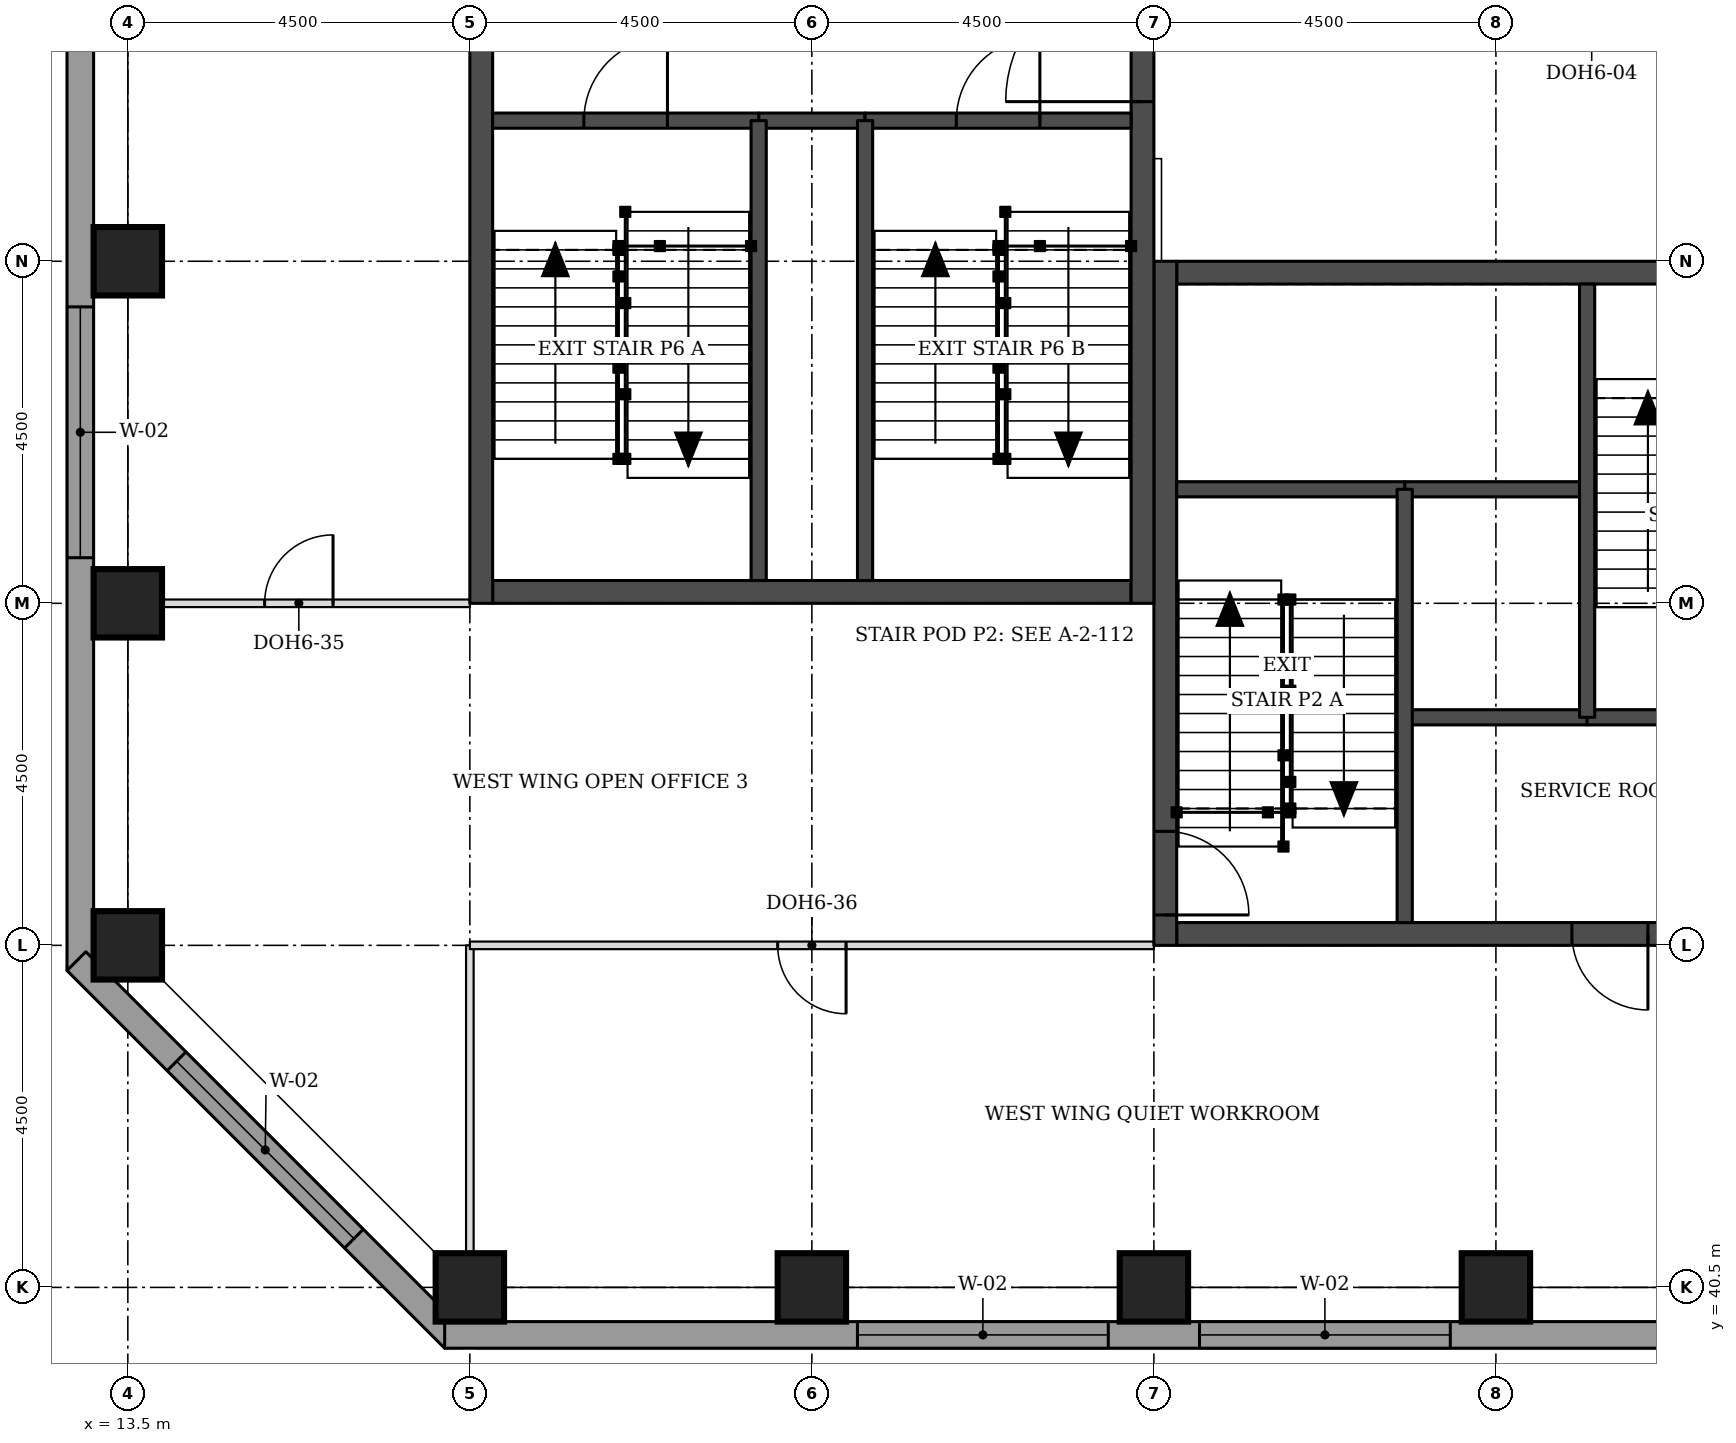
"""IFC4 building model, lengths in metres.
Left out: names, types, materials, properties, quantities, classifications, styles, units other than length and angle.
Written with IfcOpenShell. Run it as: python <this file> out.ifc"""

import sys

from ifc_helpers import new_model, si_unit, direction, frame, frame_2d, origin, origin_2d, place, context, subcontext, project, spatial, rectangle, extrude, element, fill, save


model = new_model("IFC4")
c1 = context("Model", 3, precision=1e-05, world=origin(), true_north=direction((0.0, 1.0)))
c2 = subcontext(c1, "Body", "Model", "MODEL_VIEW")
j1 = project(units=[si_unit("LENGTHUNIT", "METRE"), si_unit("PLANEANGLEUNIT", "RADIAN")], contexts=[c1])
p1 = place(None, origin())
s1 = spatial("IfcSite", under=j1, at=p1, CompositionType="ELEMENT")
p2 = place(p1, origin())
s2 = spatial("IfcBuilding", under=s1, at=p2, CompositionType="ELEMENT")
p3 = place(p2, frame((0.0, 0.0, 188.4)))
s3 = spatial("IfcBuildingStorey", under=s2, at=p3, CompositionType="ELEMENT", Elevation=188.4)
for number, where, z_axis, x_axis in (
    (1, (18.0, 40.5, 0.0), (0.0, 0.0, 1.0), (1.0, 0.0, 0.0)),
    (2, (22.5, 40.5, 0.0), (0.0, 0.0, 1.0), (1.0, 0.0, 0.0)),
    (3, (27.0, 40.5, 0.0), (0.0, 0.0, 1.0), (1.0, 0.0, 0.0)),
    (4, (31.5, 40.5, 0.0), (0.0, 0.0, 1.0), (1.0, 0.0, 0.0)),
    (5, (13.5, 45.0, 0.0), (0.0, 0.0, 1.0), (1.0, 0.0, 0.0)),
    (6, (13.5, 49.5, 0.0), (0.0, 0.0, 1.0), (1.0, 0.0, 0.0)),
    (7, (13.5, 54.0, 0.0), (0.0, 0.0, 1.0), (1.0, 0.0, 0.0)),
):
    element("IfcColumn", number, at=place(p3, frame(where, z_axis=z_axis, x_axis=x_axis)), inside=s3, PredefinedType="COLUMN", context=c2, shape_type="SweptSolid", body=[
        extrude(rectangle(XDim=0.9, YDim=0.9, at=origin_2d()), origin(), (0.0, 0.0, 1.0), 3.7),
    ])
p4 = place(p3, frame((27.3, 45.15, 0.0), z_axis=(0.0, 0.0, 1.0), x_axis=(1.0, 0.0, 0.0)))
e8 = element("IfcWall", 8, at=p4, inside=s3, PredefinedType="SHEAR", context=c2, shape_type="SweptSolid", body=[
    extrude(rectangle(XDim=8.4, YDim=0.3, at=frame_2d((4.2, 0.0))), origin(), (0.0, 0.0, 1.0), 3.7),
])
p5 = place(p4, frame((5.2, 0.0, 0.0)))
e9 = element("IfcOpeningElement", 9, at=p5, cuts=e8, PredefinedType="OPENING", context=c2, shape_type="SweptSolid", body=[
    extrude(rectangle(XDim=1.0, YDim=2.1, at=frame_2d((0.5, 1.05))), frame((0.0, 0.16, 0.0), z_axis=(0.0, -1.0, 0.0), x_axis=(1.0, 0.0, 0.0)), (0.0, 0.0, 1.0), 0.32),
])
p6 = place(p3, frame((27.3, 53.85, 0.0), z_axis=(0.0, 0.0, 1.0), x_axis=(1.0, 0.0, 0.0)))
e10 = element("IfcWall", 10, at=p6, inside=s3, PredefinedType="SHEAR", context=c2, shape_type="SweptSolid", body=[
    extrude(rectangle(XDim=8.4, YDim=0.3, at=frame_2d((4.2, 0.0))), origin(), (0.0, 0.0, 1.0), 3.7),
])
p7 = place(p6, frame((6.4, 0.0, 0.0)))
e11 = element("IfcOpeningElement", 11, at=p7, cuts=e10, PredefinedType="OPENING", context=c2, shape_type="SweptSolid", body=[
    extrude(rectangle(XDim=1.1, YDim=2.1, at=frame_2d((0.55, 1.05))), frame((0.0, 0.16, 0.0), z_axis=(0.0, -1.0, 0.0), x_axis=(1.0, 0.0, 0.0)), (0.0, 0.0, 1.0), 0.32),
])
p8 = place(p3, frame((27.15, 45.0, 0.0), z_axis=(0.0, 0.0, 1.0), x_axis=(0.0, 1.0, 0.0)))
e12 = element("IfcWall", 12, at=p8, inside=s3, PredefinedType="SHEAR", context=c2, shape_type="SweptSolid", body=[
    extrude(rectangle(XDim=9.0, YDim=0.3, at=frame_2d((4.5, 0.0))), origin(), (0.0, 0.0, 1.0), 3.7),
])
p9 = place(p8, frame((0.4, 0.0, 0.0)))
e13 = element("IfcOpeningElement", 13, at=p9, cuts=e12, PredefinedType="OPENING", context=c2, shape_type="SweptSolid", body=[
    extrude(rectangle(XDim=1.1, YDim=2.1, at=frame_2d((0.55, 1.05))), frame((0.0, 0.16, 0.0), z_axis=(0.0, -1.0, 0.0), x_axis=(1.0, 0.0, 0.0)), (0.0, 0.0, 1.0), 0.32),
])
p10 = place(p3, frame((18.3, 49.65, 0.0), z_axis=(0.0, 0.0, 1.0), x_axis=(1.0, 0.0, 0.0)))
e14 = element("IfcWall", 14, at=p10, inside=s3, PredefinedType="SHEAR", context=c2, shape_type="SweptSolid", body=[
    extrude(rectangle(XDim=8.4, YDim=0.3, at=frame_2d((4.2, 0.0))), origin(), (0.0, 0.0, 1.0), 3.7),
])
p11 = place(p3, frame((18.15, 49.5, 0.0), z_axis=(0.0, 0.0, 1.0), x_axis=(0.0, 1.0, 0.0)))
e15 = element("IfcWall", 15, at=p11, inside=s3, PredefinedType="SHEAR", context=c2, shape_type="SweptSolid", body=[
    extrude(rectangle(XDim=9.0, YDim=0.3, at=frame_2d((4.5, 0.0))), origin(), (0.0, 0.0, 1.0), 3.7),
])
p12 = place(p3, frame((26.85, 49.5, 0.0), z_axis=(0.0, 0.0, 1.0), x_axis=(0.0, 1.0, 0.0)))
e16 = element("IfcWall", 16, at=p12, inside=s3, PredefinedType="SHEAR", context=c2, shape_type="SweptSolid", body=[
    extrude(rectangle(XDim=9.0, YDim=0.3, at=frame_2d((4.5, 0.0))), origin(), (0.0, 0.0, 1.0), 3.7),
])
p13 = place(p12, frame((6.6, 0.0, 0.0)))
e17 = element("IfcOpeningElement", 17, at=p13, cuts=e16, PredefinedType="OPENING", context=c2, shape_type="SweptSolid", body=[
    extrude(rectangle(XDim=1.8, YDim=2.1, at=frame_2d((0.9, 1.05))), frame((0.0, 0.16, 0.0), z_axis=(0.0, -1.0, 0.0), x_axis=(1.0, 0.0, 0.0)), (0.0, 0.0, 1.0), 0.32),
])
p14 = place(p3, frame((12.875, 58.831, 0.0), z_axis=(0.0, 0.0, 1.0), x_axis=(0.0, -1.0, 0.0)))
e18 = element("IfcWall", 18, at=p14, inside=s3, PredefinedType="STANDARD", context=c2, shape_type="SweptSolid", body=[
    extrude(rectangle(XDim=14.163, YDim=0.35, at=frame_2d((7.081, 0.0))), origin(), (0.0, 0.0, 1.0), 3.525),
])
p15 = place(p14, frame((5.431, 0.0, 0.9)))
e19 = element("IfcOpeningElement", 19, at=p15, cuts=e18, PredefinedType="OPENING", context=c2, shape_type="SweptSolid", body=[
    extrude(rectangle(XDim=3.3, YDim=1.9, at=frame_2d((1.65, 0.95))), frame((0.0, 0.185, 0.0), z_axis=(0.0, -1.0, 0.0), x_axis=(1.0, 0.0, 0.0)), (0.0, 0.0, 1.0), 0.37),
])
p16 = place(p3, frame((12.824, 44.792, 0.0), z_axis=(0.0, 0.0, 1.0), x_axis=(0.707106781187, -0.707106781187, 0.0)))
e20 = element("IfcWall", 20, at=p16, inside=s3, PredefinedType="STANDARD", context=c2, shape_type="SweptSolid", body=[
    extrude(rectangle(XDim=7.027, YDim=0.35, at=frame_2d((3.513, 0.0))), origin(), (0.0, 0.0, 1.0), 3.525),
])
p17 = place(p16, frame((1.863, 0.0, 0.9)))
e21 = element("IfcOpeningElement", 21, at=p17, cuts=e20, PredefinedType="OPENING", context=c2, shape_type="SweptSolid", body=[
    extrude(rectangle(XDim=3.3, YDim=1.9, at=frame_2d((1.65, 0.95))), frame((0.0, 0.185, 0.0), z_axis=(0.0, -1.0, 0.0), x_axis=(1.0, 0.0, 0.0)), (0.0, 0.0, 1.0), 0.37),
])
p18 = place(p3, frame((17.669, 39.875, 0.0), z_axis=(0.0, 0.0, 1.0), x_axis=(1.0, 0.0, 0.0)))
e22 = element("IfcWall", 22, at=p18, inside=s3, PredefinedType="STANDARD", context=c2, shape_type="SweptSolid", body=[
    extrude(rectangle(XDim=18.331, YDim=0.35, at=frame_2d((9.166, 0.0))), origin(), (0.0, 0.0, 1.0), 3.525),
])
p19 = place(p18, frame((5.431, 0.0, 0.9)))
e23 = element("IfcOpeningElement", 23, at=p19, cuts=e22, PredefinedType="OPENING", context=c2, shape_type="SweptSolid", body=[
    extrude(rectangle(XDim=3.3, YDim=1.9, at=frame_2d((1.65, 0.95))), frame((0.0, 0.185, 0.0), z_axis=(0.0, -1.0, 0.0), x_axis=(1.0, 0.0, 0.0)), (0.0, 0.0, 1.0), 0.37),
])
p20 = place(p18, frame((9.931, 0.0, 0.9)))
e24 = element("IfcOpeningElement", 24, at=p20, cuts=e22, PredefinedType="OPENING", context=c2, shape_type="SweptSolid", body=[
    extrude(rectangle(XDim=3.3, YDim=1.9, at=frame_2d((1.65, 0.95))), frame((0.0, 0.185, 0.0), z_axis=(0.0, -1.0, 0.0), x_axis=(1.0, 0.0, 0.0)), (0.0, 0.0, 1.0), 0.37),
])
p21 = place(p3, frame((13.5, 49.5, 0.0), z_axis=(0.0, 0.0, 1.0), x_axis=(1.0, 0.0, 0.0)))
e25 = element("IfcWall", 25, at=p21, inside=s3, PredefinedType="PARTITIONING", context=c2, shape_type="SweptSolid", body=[
    extrude(rectangle(XDim=4.5, YDim=0.1, at=frame_2d((2.25, 0.0))), origin(), (0.0, 0.0, 1.0), 3.55),
])
p22 = place(p21, frame((1.8, 0.0, 0.0)))
e26 = element("IfcOpeningElement", 26, at=p22, cuts=e25, PredefinedType="OPENING", context=c2, shape_type="SweptSolid", body=[
    extrude(rectangle(XDim=0.9, YDim=2.1, at=frame_2d((0.45, 1.05))), frame((0.0, 0.06, 0.0), z_axis=(0.0, -1.0, 0.0), x_axis=(1.0, 0.0, 0.0)), (0.0, 0.0, 1.0), 0.12),
])
p23 = place(p3, frame((18.0, 40.5, 0.0), z_axis=(0.0, 0.0, 1.0), x_axis=(0.0, 1.0, 0.0)))
e27 = element("IfcWall", 27, at=p23, inside=s3, PredefinedType="PARTITIONING", context=c2, shape_type="SweptSolid", body=[
    extrude(rectangle(XDim=4.5, YDim=0.1, at=frame_2d((2.25, 0.0))), origin(), (0.0, 0.0, 1.0), 3.55),
])
p24 = place(p3, frame((18.0, 45.0, 0.0), z_axis=(0.0, 0.0, 1.0), x_axis=(1.0, 0.0, 0.0)))
e28 = element("IfcWall", 28, at=p24, inside=s3, PredefinedType="PARTITIONING", context=c2, shape_type="SweptSolid", body=[
    extrude(rectangle(XDim=9.0, YDim=0.1, at=frame_2d((4.5, 0.0))), origin(), (0.0, 0.0, 1.0), 2.55),
])
p25 = place(p24, frame((4.05, 0.0, 0.0)))
e29 = element("IfcOpeningElement", 29, at=p25, cuts=e28, PredefinedType="OPENING", context=c2, shape_type="SweptSolid", body=[
    extrude(rectangle(XDim=0.9, YDim=2.1, at=frame_2d((0.45, 1.05))), frame((0.0, 0.06, 0.0), z_axis=(0.0, -1.0, 0.0), x_axis=(1.0, 0.0, 0.0)), (0.0, 0.0, 1.0), 0.12),
])
p26 = place(p3, frame((30.3, 48.0, 0.0), z_axis=(0.0, 0.0, 1.0), x_axis=(1.0, 0.0, 0.0)))
e30 = element("IfcWall", 30, at=p26, inside=s3, PredefinedType="SOLIDWALL", context=c2, shape_type="SweptSolid", body=[
    extrude(rectangle(XDim=2.4, YDim=0.2, at=frame_2d((1.2, 0.0))), origin(), (0.0, 0.0, 1.0), 3.55),
])
p27 = place(p3, frame((32.7, 48.0, 0.0), z_axis=(0.0, 0.0, 1.0), x_axis=(1.0, 0.0, 0.0)))
e31 = element("IfcWall", 31, at=p27, inside=s3, PredefinedType="SOLIDWALL", context=c2, shape_type="SweptSolid", body=[
    extrude(rectangle(XDim=3.0, YDim=0.2, at=frame_2d((1.5, 0.0))), origin(), (0.0, 0.0, 1.0), 3.55),
])
p28 = place(p3, frame((30.3, 51.0, 0.0), z_axis=(0.0, 0.0, 1.0), x_axis=(1.0, 0.0, 0.0)))
e32 = element("IfcWall", 32, at=p28, inside=s3, PredefinedType="SOLIDWALL", context=c2, shape_type="SweptSolid", body=[
    extrude(rectangle(XDim=2.4, YDim=0.2, at=frame_2d((1.2, 0.0))), origin(), (0.0, 0.0, 1.0), 3.7),
])
p29 = place(p3, frame((27.3, 51.0, 0.0), z_axis=(0.0, 0.0, 1.0), x_axis=(1.0, 0.0, 0.0)))
e33 = element("IfcWall", 33, at=p29, inside=s3, PredefinedType="SOLIDWALL", context=c2, shape_type="SweptSolid", body=[
    extrude(rectangle(XDim=3.0, YDim=0.2, at=frame_2d((1.5, 0.0))), origin(), (0.0, 0.0, 1.0), 3.55),
])
for number, where, z_axis, x_axis in (
    (34, (30.3, 45.3, 0.0), (0.0, 0.0, 1.0), (0.0, 1.0, 0.0)),
    (35, (32.7, 48.0, 0.0), (0.0, 0.0, 1.0), (0.0, 1.0, 0.0)),
):
    element("IfcWall", number, at=place(p3, frame(where, z_axis=z_axis, x_axis=x_axis)), inside=s3, PredefinedType="SOLIDWALL", context=c2, shape_type="SweptSolid", body=[
        extrude(rectangle(XDim=5.7, YDim=0.2, at=frame_2d((2.85, 0.0))), origin(), (0.0, 0.0, 1.0), 3.55),
    ])
p30 = place(p3, frame((21.8, 55.85, 0.0), z_axis=(0.0, 0.0, 1.0), x_axis=(1.0, 0.0, 0.0)))
e36 = element("IfcWall", 36, at=p30, inside=s3, PredefinedType="SOLIDWALL", context=c2, shape_type="SweptSolid", body=[
    extrude(rectangle(XDim=1.4, YDim=0.2, at=frame_2d((0.7, 0.0))), origin(), (0.0, 0.0, 1.0), 3.55),
])
p31 = place(p3, frame((18.3, 55.85, 0.0), z_axis=(0.0, 0.0, 1.0), x_axis=(1.0, 0.0, 0.0)))
e37 = element("IfcWall", 37, at=p31, inside=s3, PredefinedType="SOLIDWALL", context=c2, shape_type="SweptSolid", body=[
    extrude(rectangle(XDim=3.5, YDim=0.2, at=frame_2d((1.75, 0.0))), origin(), (0.0, 0.0, 1.0), 3.55),
])
p32 = place(p31, frame((1.2, 0.0, 0.0)))
e38 = element("IfcOpeningElement", 38, at=p32, cuts=e37, PredefinedType="OPENING", context=c2, shape_type="SweptSolid", body=[
    extrude(rectangle(XDim=1.1, YDim=2.1, at=frame_2d((0.55, 1.05))), frame((0.0, 0.11, 0.0), z_axis=(0.0, -1.0, 0.0), x_axis=(1.0, 0.0, 0.0)), (0.0, 0.0, 1.0), 0.22),
])
p33 = place(p3, frame((23.2, 55.85, 0.0), z_axis=(0.0, 0.0, 1.0), x_axis=(1.0, 0.0, 0.0)))
e39 = element("IfcWall", 39, at=p33, inside=s3, PredefinedType="SOLIDWALL", context=c2, shape_type="SweptSolid", body=[
    extrude(rectangle(XDim=3.5, YDim=0.2, at=frame_2d((1.75, 0.0))), origin(), (0.0, 0.0, 1.0), 3.55),
])
p34 = place(p33, frame((1.2, 0.0, 0.0)))
e40 = element("IfcOpeningElement", 40, at=p34, cuts=e39, PredefinedType="OPENING", context=c2, shape_type="SweptSolid", body=[
    extrude(rectangle(XDim=1.1, YDim=2.1, at=frame_2d((0.55, 1.05))), frame((0.0, 0.11, 0.0), z_axis=(0.0, -1.0, 0.0), x_axis=(1.0, 0.0, 0.0)), (0.0, 0.0, 1.0), 0.22),
])
for number, where, z_axis, x_axis in (
    (41, (21.8, 49.8, 0.0), (0.0, 0.0, 1.0), (0.0, 1.0, 0.0)),
    (42, (23.2, 49.8, 0.0), (0.0, 0.0, 1.0), (0.0, 1.0, 0.0)),
):
    element("IfcWall", number, at=place(p3, frame(where, z_axis=z_axis, x_axis=x_axis)), inside=s3, PredefinedType="SOLIDWALL", context=c2, shape_type="SweptSolid", body=[
        extrude(rectangle(XDim=6.05, YDim=0.2, at=frame_2d((3.025, 0.0))), origin(), (0.0, 0.0, 1.0), 3.55),
    ])
p35 = place(p15, origin())
e43 = element("IfcWindow", 43, at=p35, inside=s3, PartitioningType="SINGLE_PANEL", PredefinedType="WINDOW", context=c2, shape_type="SweptSolid", body=[
    extrude(rectangle(XDim=3.3, YDim=1.9, at=frame_2d((1.65, 0.95))), frame((0.0, 0.085, 0.0), z_axis=(0.0, -1.0, 0.0), x_axis=(1.0, 0.0, 0.0)), (0.0, 0.0, 1.0), 0.06),
])
fill(e19, e43)
p36 = place(p17, origin())
e44 = element("IfcWindow", 44, at=p36, inside=s3, PartitioningType="SINGLE_PANEL", PredefinedType="WINDOW", context=c2, shape_type="SweptSolid", body=[
    extrude(rectangle(XDim=3.3, YDim=1.9, at=frame_2d((1.65, 0.95))), frame((0.0, 0.085, 0.0), z_axis=(0.0, -1.0, 0.0), x_axis=(1.0, 0.0, 0.0)), (0.0, 0.0, 1.0), 0.06),
])
fill(e21, e44)
p37 = place(p19, origin())
e45 = element("IfcWindow", 45, at=p37, inside=s3, PartitioningType="SINGLE_PANEL", PredefinedType="WINDOW", context=c2, shape_type="SweptSolid", body=[
    extrude(rectangle(XDim=3.3, YDim=1.9, at=frame_2d((1.65, 0.95))), frame((0.0, 0.085, 0.0), z_axis=(0.0, -1.0, 0.0), x_axis=(1.0, 0.0, 0.0)), (0.0, 0.0, 1.0), 0.06),
])
fill(e23, e45)
p38 = place(p20, origin())
e46 = element("IfcWindow", 46, at=p38, inside=s3, PartitioningType="SINGLE_PANEL", PredefinedType="WINDOW", context=c2, shape_type="SweptSolid", body=[
    extrude(rectangle(XDim=3.3, YDim=1.9, at=frame_2d((1.65, 0.95))), frame((0.0, 0.085, 0.0), z_axis=(0.0, -1.0, 0.0), x_axis=(1.0, 0.0, 0.0)), (0.0, 0.0, 1.0), 0.06),
])
fill(e24, e46)
p39 = place(p22, origin())
e47 = element("IfcDoor", 47, at=p39, inside=s3, OperationType="SINGLE_SWING_RIGHT", PredefinedType="DOOR", context=c2, shape_type="SweptSolid", body=[
    extrude(rectangle(XDim=0.9, YDim=2.1, at=frame_2d((0.45, 1.05))), frame((0.0, 0.025, 0.0), z_axis=(0.0, -1.0, 0.0), x_axis=(1.0, 0.0, 0.0)), (0.0, 0.0, 1.0), 0.05),
])
fill(e26, e47)
p40 = place(p25, frame((0.9, 0.0, 0.0), z_axis=(0.0, 0.0, 1.0), x_axis=(-1.0, 0.0, 0.0)))
e48 = element("IfcDoor", 48, at=p40, inside=s3, OperationType="SINGLE_SWING_LEFT", PredefinedType="DOOR", context=c2, shape_type="SweptSolid", body=[
    extrude(rectangle(XDim=0.9, YDim=2.1, at=frame_2d((0.45, 1.05))), frame((0.0, 0.025, 0.0), z_axis=(0.0, -1.0, 0.0), x_axis=(1.0, 0.0, 0.0)), (0.0, 0.0, 1.0), 0.05),
])
fill(e29, e48)
p41 = place(p9, frame((1.1, 0.0, 0.0), z_axis=(0.0, 0.0, 1.0), x_axis=(-1.0, 0.0, 0.0)))
e49 = element("IfcDoor", 49, at=p41, inside=s3, OperationType="SINGLE_SWING_RIGHT", PredefinedType="DOOR", context=c2, shape_type="SweptSolid", body=[
    extrude(rectangle(XDim=1.1, YDim=2.1, at=frame_2d((0.55, 1.05))), frame((0.0, 0.025, 0.0), z_axis=(0.0, -1.0, 0.0), x_axis=(1.0, 0.0, 0.0)), (0.0, 0.0, 1.0), 0.05),
])
fill(e13, e49)
p42 = place(p5, frame((1.0, 0.0, 0.0), z_axis=(0.0, 0.0, 1.0), x_axis=(-1.0, 0.0, 0.0)))
e50 = element("IfcDoor", 50, at=p42, inside=s3, OperationType="SINGLE_SWING_LEFT", PredefinedType="DOOR", context=c2, shape_type="SweptSolid", body=[
    extrude(rectangle(XDim=1.0, YDim=2.1, at=frame_2d((0.5, 1.05))), frame((0.0, 0.025, 0.0), z_axis=(0.0, -1.0, 0.0), x_axis=(1.0, 0.0, 0.0)), (0.0, 0.0, 1.0), 0.05),
])
fill(e9, e50)
p43 = place(p32, origin())
e51 = element("IfcDoor", 51, at=p43, inside=s3, OperationType="SINGLE_SWING_RIGHT", PredefinedType="DOOR", context=c2, shape_type="SweptSolid", body=[
    extrude(rectangle(XDim=1.1, YDim=2.1, at=frame_2d((0.55, 1.05))), frame((0.0, 0.025, 0.0), z_axis=(0.0, -1.0, 0.0), x_axis=(1.0, 0.0, 0.0)), (0.0, 0.0, 1.0), 0.05),
])
fill(e38, e51)
p44 = place(p34, origin())
e52 = element("IfcDoor", 52, at=p44, inside=s3, OperationType="SINGLE_SWING_RIGHT", PredefinedType="DOOR", context=c2, shape_type="SweptSolid", body=[
    extrude(rectangle(XDim=1.1, YDim=2.1, at=frame_2d((0.55, 1.05))), frame((0.0, 0.025, 0.0), z_axis=(0.0, -1.0, 0.0), x_axis=(1.0, 0.0, 0.0)), (0.0, 0.0, 1.0), 0.05),
])
fill(e40, e52)
p45 = place(p13, origin())
e53 = element("IfcDoor", 53, at=p45, inside=s3, OperationType="SINGLE_SWING_LEFT", PredefinedType="DOOR", context=c2, shape_type="SweptSolid", body=[
    extrude(rectangle(XDim=1.8, YDim=2.1, at=frame_2d((0.9, 1.05))), frame((0.0, 0.025, 0.0), z_axis=(0.0, -1.0, 0.0), x_axis=(1.0, 0.0, 0.0)), (0.0, 0.0, 1.0), 0.05),
])
fill(e17, e53)
save(model, sys.argv[1])
